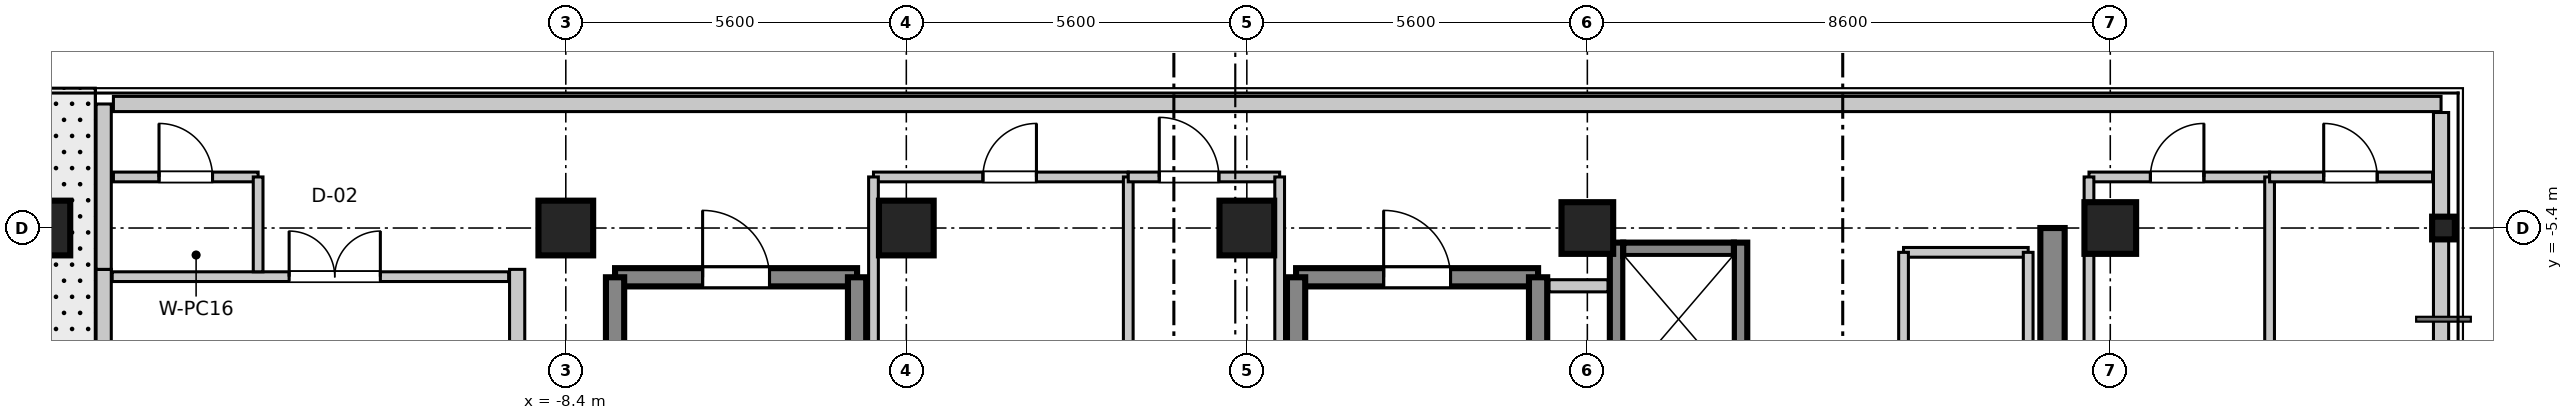
"""IFC4 building model, lengths in metres.
Left out: names, types, materials, properties, quantities, classifications, styles, units other than length and angle.
Written with IfcOpenShell. Run it as: python <this file> out.ifc"""

import sys

from ifc_helpers import new_model, si_unit, direction, frame, frame_2d, origin, origin_2d, place, context, subcontext, project, spatial, rectangle, i_section, extrude, source, transform, mapped, element, fill, save


model = new_model("IFC4")
c1 = context("Model", 3, precision=1e-05, world=origin(), true_north=direction((0.0, 1.0)))
c2 = subcontext(c1, "Body", "Model", "MODEL_VIEW")
j1 = project(units=[si_unit("LENGTHUNIT", "METRE"), si_unit("PLANEANGLEUNIT", "RADIAN")], contexts=[c1])
p1 = place(None, origin())
s1 = spatial("IfcSite", under=j1, at=p1, CompositionType="ELEMENT")
p2 = place(p1, origin())
s2 = spatial("IfcBuilding", under=s1, at=p2, CompositionType="ELEMENT")
p3 = place(p2, frame((0.0, 0.0, 296.5)))
s3 = spatial("IfcBuildingStorey", under=s2, at=p3, CompositionType="ELEMENT", Elevation=296.5)
m1 = source(origin(), c2, "Body", "SweptSolid", [
    extrude(rectangle(XDim=0.9, YDim=0.9, at=origin_2d()), origin(), (0.0, 0.0, 1.0), 3.805),
])
for number, where, z_axis, x_axis in (
    (1, (-17.0, -5.4, 0.0), (0.0, 0.0, 1.0), (1.0, 0.0, 0.0)),
    (2, (-8.4, -5.4, 0.0), (0.0, 0.0, 1.0), (1.0, 0.0, 0.0)),
    (3, (-2.8, -5.4, 0.0), (0.0, 0.0, 1.0), (1.0, 0.0, 0.0)),
    (4, (2.8, -5.4, 0.0), (0.0, 0.0, 1.0), (1.0, 0.0, 0.0)),
):
    element("IfcColumn", number, at=place(p3, frame(where, z_axis=z_axis, x_axis=x_axis)), inside=s3, PredefinedType="COLUMN", context=c2, shape_type="MappedRepresentation", body=[
        mapped(m1, transform((0.0, 0.0, 0.0), scale=1.0)),
    ])
m2 = source(origin(), c2, "Body", "SweptSolid", [
    extrude(rectangle(XDim=0.85, YDim=0.85, at=origin_2d()), origin(), (0.0, 0.0, 1.0), 3.805),
])
for number, where, z_axis, x_axis in (
    (5, (8.4, -5.4, 0.0), (0.0, 0.0, 1.0), (1.0, 0.0, 0.0)),
    (6, (17.0, -5.4, 0.0), (0.0, 0.0, 1.0), (1.0, 0.0, 0.0)),
):
    element("IfcColumn", number, at=place(p3, frame(where, z_axis=z_axis, x_axis=x_axis)), inside=s3, PredefinedType="PILASTER", context=c2, shape_type="MappedRepresentation", body=[
        mapped(m2, transform((0.0, 0.0, 0.0), scale=1.0)),
    ])
m3 = source(origin(), c2, "Body", "SweptSolid", [
    extrude(i_section(OverallWidth=0.374, OverallDepth=0.374, WebThickness=0.014, FlangeThickness=0.023, at=origin_2d()), origin(), (0.0, 0.0, 1.0), 3.805),
])
p4 = place(p3, frame((22.48, -5.4, 0.0), z_axis=(0.0, 0.0, 1.0), x_axis=(1.0, 0.0, 0.0)))
e7 = element("IfcColumn", 7, at=p4, inside=s3, PredefinedType="COLUMN", context=c2, shape_type="MappedRepresentation", body=[
    mapped(m3, transform((0.0, 0.0, 0.0), scale=1.0)),
])
m4 = source(origin(), c2, "Body", "SweptSolid", [
    extrude(rectangle(XDim=11.6, YDim=0.4, at=frame_2d((5.8, 0.0))), origin(), (0.0, 0.0, 1.0), 3.55),
])
p5 = place(p3, frame((16.05, -17.0, 0.0), z_axis=(0.0, 0.0, 1.0), x_axis=(0.0, 1.0, 0.0)))
e8 = element("IfcWall", 8, at=p5, inside=s3, PredefinedType="SHEAR", context=c2, shape_type="MappedRepresentation", body=[
    mapped(m4, transform((0.0, 0.0, 0.0), scale=1.0)),
])
m5 = source(origin(), c2, "Body", "SweptSolid", [
    extrude(rectangle(XDim=3.98, YDim=0.3, at=frame_2d((1.99, 0.0))), origin(), (0.0, 0.0, 1.0), 3.55),
])
p6 = place(p3, frame((3.61, -6.21, 0.0), z_axis=(0.0, 0.0, 1.0), x_axis=(1.0, 0.0, 0.0)))
e9 = element("IfcWall", 9, at=p6, inside=s3, PredefinedType="SHEAR", context=c2, shape_type="MappedRepresentation", body=[
    mapped(m5, transform((0.0, 0.0, 0.0), scale=1.0)),
])
p7 = place(p6, frame((1.44, 0.0, 0.0)))
e10 = element("IfcOpeningElement", 10, at=p7, cuts=e9, PredefinedType="OPENING", context=c2, shape_type="SweptSolid", body=[
    extrude(rectangle(XDim=1.1, YDim=2.15, at=frame_2d((0.55, 1.075))), frame((0.0, 0.16, 0.0), z_axis=(0.0, -1.0, 0.0), x_axis=(1.0, 0.0, 0.0)), (0.0, 0.0, 1.0), 0.32),
])
m6 = source(origin(), c2, "Body", "SweptSolid", [
    extrude(rectangle(XDim=9.38, YDim=0.3, at=frame_2d((4.69, 0.0))), origin(), (0.0, 0.0, 1.0), 3.55),
])
for number, where, z_axis, x_axis in (
    (11, (3.61, -15.59, 0.0), (0.0, 0.0, 1.0), (0.0, 1.0, 0.0)),
    (12, (7.59, -15.59, 0.0), (0.0, 0.0, 1.0), (0.0, 1.0, 0.0)),
):
    element("IfcWall", number, at=place(p3, frame(where, z_axis=z_axis, x_axis=x_axis)), inside=s3, PredefinedType="SHEAR", context=c2, shape_type="MappedRepresentation", body=[
        mapped(m6, transform((0.0, 0.0, 0.0), scale=1.0)),
    ])
p8 = place(p3, frame((-7.59, -6.21, 0.0), z_axis=(0.0, 0.0, 1.0), x_axis=(1.0, 0.0, 0.0)))
e13 = element("IfcWall", 13, at=p8, inside=s3, PredefinedType="SHEAR", context=c2, shape_type="MappedRepresentation", body=[
    mapped(m5, transform((0.0, 0.0, 0.0), scale=1.0)),
])
p9 = place(p8, frame((1.44, 0.0, 0.0)))
e14 = element("IfcOpeningElement", 14, at=p9, cuts=e13, PredefinedType="OPENING", context=c2, shape_type="SweptSolid", body=[
    extrude(rectangle(XDim=1.1, YDim=2.15, at=frame_2d((0.55, 1.075))), frame((0.0, 0.16, 0.0), z_axis=(0.0, -1.0, 0.0), x_axis=(1.0, 0.0, 0.0)), (0.0, 0.0, 1.0), 0.32),
])
for number, where, z_axis, x_axis in (
    (15, (-7.59, -15.59, 0.0), (0.0, 0.0, 1.0), (0.0, 1.0, 0.0)),
    (16, (-3.61, -15.59, 0.0), (0.0, 0.0, 1.0), (0.0, 1.0, 0.0)),
):
    element("IfcWall", number, at=place(p3, frame(where, z_axis=z_axis, x_axis=x_axis)), inside=s3, PredefinedType="SHEAR", context=c2, shape_type="MappedRepresentation", body=[
        mapped(m6, transform((0.0, 0.0, 0.0), scale=1.0)),
    ])
m7 = source(origin(), c2, "Body", "SweptSolid", [
    extrude(rectangle(XDim=2.36, YDim=0.22, at=frame_2d((1.18, 0.0))), origin(), (0.0, 0.0, 1.0), 3.55),
])
for number, where, z_axis, x_axis in (
    (17, (8.88, -8.0, 0.0), (0.0, 0.0, 1.0), (0.0, 1.0, 0.0)),
    (18, (10.92, -8.0, 0.0), (0.0, 0.0, 1.0), (0.0, 1.0, 0.0)),
):
    element("IfcWall", number, at=place(p3, frame(where, z_axis=z_axis, x_axis=x_axis)), inside=s3, PredefinedType="SHEAR", context=c2, shape_type="MappedRepresentation", body=[
        mapped(m7, transform((0.0, 0.0, 0.0), scale=1.0)),
    ])
m8 = source(origin(), c2, "Body", "SweptSolid", [
    extrude(rectangle(XDim=1.82, YDim=0.22, at=frame_2d((0.91, 0.0))), origin(), (0.0, 0.0, 1.0), 3.55),
])
p10 = place(p3, frame((8.99, -5.75, 0.0), z_axis=(0.0, 0.0, 1.0), x_axis=(1.0, 0.0, 0.0)))
e19 = element("IfcWall", 19, at=p10, inside=s3, PredefinedType="SHEAR", context=c2, shape_type="MappedRepresentation", body=[
    mapped(m8, transform((0.0, 0.0, 0.0), scale=1.0)),
])
m9 = source(origin(), c2, "Body", "SweptSolid", [
    extrude(rectangle(XDim=8.84, YDim=0.25, at=frame_2d((4.42, 0.0))), origin(), (0.0, 0.0, 1.0), 2.99),
])
for number, where, z_axis, x_axis in (
    (20, (-16.0, -14.92, 0.0), (0.0, 0.0, 1.0), (0.0, 1.0, 0.0)),
    (21, (-9.2, -14.92, 0.0), (0.0, 0.0, 1.0), (0.0, 1.0, 0.0)),
):
    element("IfcWall", number, at=place(p3, frame(where, z_axis=z_axis, x_axis=x_axis)), inside=s3, PredefinedType="STANDARD", context=c2, shape_type="MappedRepresentation", body=[
        mapped(m9, transform((0.0, 0.0, 0.0), scale=1.0)),
    ])
m10 = source(origin(), c2, "Body", "SweptSolid", [
    extrude(rectangle(XDim=0.97, YDim=0.2, at=frame_2d((0.485, 0.0))), origin(), (0.0, 0.0, 1.0), 2.89),
])
p11 = place(p3, frame((7.77, -6.35, 0.0), z_axis=(0.0, 0.0, 1.0), x_axis=(1.0, 0.0, 0.0)))
e22 = element("IfcWall", 22, at=p11, inside=s3, PredefinedType="PARTITIONING", context=c2, shape_type="MappedRepresentation", body=[
    mapped(m10, transform((0.0, 0.0, 0.0), scale=1.0)),
])
m11 = source(origin(), c2, "Body", "SweptSolid", [
    extrude(rectangle(XDim=38.28, YDim=0.25, at=frame_2d((19.14, 0.0))), origin(), (0.0, 0.0, 1.0), 2.89),
])
p12 = place(p3, frame((-15.84, -3.36, 0.0), z_axis=(0.0, 0.0, 1.0), x_axis=(1.0, 0.0, 0.0)))
e23 = element("IfcWall", 23, at=p12, inside=s3, PredefinedType="STANDARD", context=c2, shape_type="MappedRepresentation", body=[
    mapped(m11, transform((0.0, 0.0, 0.0), scale=1.0)),
])
m12 = source(origin(), c2, "Body", "SweptSolid", [
    extrude(rectangle(XDim=2.72, YDim=0.25, at=frame_2d((1.36, 0.0))), origin(), (0.0, 0.0, 1.0), 2.89),
])
p13 = place(p3, frame((-16.0, -6.08, 0.0), z_axis=(0.0, 0.0, 1.0), x_axis=(0.0, 1.0, 0.0)))
e24 = element("IfcWall", 24, at=p13, inside=s3, PredefinedType="STANDARD", context=c2, shape_type="MappedRepresentation", body=[
    mapped(m12, transform((0.0, 0.0, 0.0), scale=1.0)),
])
m13 = source(origin(), c2, "Body", "SweptSolid", [
    extrude(rectangle(XDim=16.12, YDim=0.25, at=frame_2d((8.06, 0.0))), origin(), (0.0, 0.0, 1.0), 2.89),
])
p14 = place(p3, frame((22.44, -19.62, 0.0), z_axis=(0.0, 0.0, 1.0), x_axis=(0.0, 1.0, 0.0)))
e25 = element("IfcWall", 25, at=p14, inside=s3, PredefinedType="STANDARD", context=c2, shape_type="MappedRepresentation", body=[
    mapped(m13, transform((0.0, 0.0, 0.0), scale=1.0)),
])
m14 = source(origin(), c2, "Body", "SweptSolid", [
    extrude(rectangle(XDim=2.05, YDim=0.16, at=frame_2d((1.025, 0.0))), origin(), (0.0, 0.0, 1.0), 2.89),
])
p15 = place(p3, frame((13.6, -5.8, 0.0), z_axis=(0.0, 0.0, 1.0), x_axis=(1.0, 0.0, 0.0)))
e26 = element("IfcWall", 26, at=p15, inside=s3, PredefinedType="PARTITIONING", context=c2, shape_type="MappedRepresentation", body=[
    mapped(m14, transform((0.0, 0.0, 0.0), scale=1.0)),
])
m15 = source(origin(), c2, "Body", "SweptSolid", [
    extrude(rectangle(XDim=8.7, YDim=0.16, at=frame_2d((4.35, 0.0))), origin(), (0.0, 0.0, 1.0), 2.89),
])
p16 = place(p3, frame((13.6, -14.5, 0.0), z_axis=(0.0, 0.0, 1.0), x_axis=(0.0, 1.0, 0.0)))
e27 = element("IfcWall", 27, at=p16, inside=s3, PredefinedType="PARTITIONING", context=c2, shape_type="MappedRepresentation", body=[
    mapped(m15, transform((0.0, 0.0, 0.0), scale=1.0)),
])
p17 = place(p16, frame((3.85, 0.0, 0.0)))
e28 = element("IfcOpeningElement", 28, at=p17, cuts=e27, PredefinedType="OPENING", context=c2, shape_type="SweptSolid", body=[
    extrude(rectangle(XDim=1.0, YDim=2.1, at=frame_2d((0.5, 1.05))), frame((0.0, 0.09, 0.0), z_axis=(0.0, -1.0, 0.0), x_axis=(1.0, 0.0, 0.0)), (0.0, 0.0, 1.0), 0.18),
])
p18 = place(p3, frame((15.65, -14.5, 0.0), z_axis=(0.0, 0.0, 1.0), x_axis=(0.0, 1.0, 0.0)))
e29 = element("IfcWall", 29, at=p18, inside=s3, PredefinedType="PARTITIONING", context=c2, shape_type="MappedRepresentation", body=[
    mapped(m15, transform((0.0, 0.0, 0.0), scale=1.0)),
])
m16 = source(origin(), c2, "Body", "SweptSolid", [
    extrude(rectangle(XDim=6.52, YDim=0.16, at=frame_2d((3.26, 0.0))), origin(), (0.0, 0.0, 1.0), 2.89),
])
p19 = place(p3, frame((-15.86, -6.2, 0.0), z_axis=(0.0, 0.0, 1.0), x_axis=(1.0, 0.0, 0.0)))
e30 = element("IfcWall", 30, at=p19, inside=s3, PredefinedType="PARTITIONING", context=c2, shape_type="MappedRepresentation", body=[
    mapped(m16, transform((0.0, 0.0, 0.0), scale=1.0)),
])
p20 = place(p19, frame((2.91, 0.0, 0.0)))
e31 = element("IfcOpeningElement", 31, at=p20, cuts=e30, PredefinedType="OPENING", context=c2, shape_type="SweptSolid", body=[
    extrude(rectangle(XDim=1.5, YDim=2.15, at=frame_2d((0.75, 1.075))), frame((0.0, 0.09, 0.0), z_axis=(0.0, -1.0, 0.0), x_axis=(1.0, 0.0, 0.0)), (0.0, 0.0, 1.0), 0.18),
])
m17 = source(origin(), c2, "Body", "SweptSolid", [
    extrude(rectangle(XDim=2.38, YDim=0.16, at=frame_2d((1.19, 0.0))), origin(), (0.0, 0.0, 1.0), 2.89),
])
p21 = place(p3, frame((-15.84, -4.56, 0.0), z_axis=(0.0, 0.0, 1.0), x_axis=(1.0, 0.0, 0.0)))
e32 = element("IfcWall", 32, at=p21, inside=s3, PredefinedType="PARTITIONING", context=c2, shape_type="MappedRepresentation", body=[
    mapped(m17, transform((0.0, 0.0, 0.0), scale=1.0)),
])
p22 = place(p21, frame((0.75, 0.0, 0.0)))
e33 = element("IfcOpeningElement", 33, at=p22, cuts=e32, PredefinedType="OPENING", context=c2, shape_type="SweptSolid", body=[
    extrude(rectangle(XDim=0.88, YDim=2.1, at=frame_2d((0.44, 1.05))), frame((0.0, 0.09, 0.0), z_axis=(0.0, -1.0, 0.0), x_axis=(1.0, 0.0, 0.0)), (0.0, 0.0, 1.0), 0.18),
])
m18 = source(origin(), c2, "Body", "SweptSolid", [
    extrude(rectangle(XDim=1.56, YDim=0.16, at=frame_2d((0.78, 0.0))), origin(), (0.0, 0.0, 1.0), 2.89),
])
p23 = place(p3, frame((-13.46, -6.12, 0.0), z_axis=(0.0, 0.0, 1.0), x_axis=(0.0, 1.0, 0.0)))
e34 = element("IfcWall", 34, at=p23, inside=s3, PredefinedType="PARTITIONING", context=c2, shape_type="MappedRepresentation", body=[
    mapped(m18, transform((0.0, 0.0, 0.0), scale=1.0)),
])
m19 = source(origin(), c2, "Body", "SweptSolid", [
    extrude(rectangle(XDim=4.19, YDim=0.16, at=frame_2d((2.095, 0.0))), origin(), (0.0, 0.0, 1.0), 2.89),
])
p24 = place(p3, frame((-3.34, -4.56, 0.0), z_axis=(0.0, 0.0, 1.0), x_axis=(1.0, 0.0, 0.0)))
e35 = element("IfcWall", 35, at=p24, inside=s3, PredefinedType="PARTITIONING", context=c2, shape_type="MappedRepresentation", body=[
    mapped(m19, transform((0.0, 0.0, 0.0), scale=1.0)),
])
p25 = place(p24, frame((1.8, 0.0, 0.0)))
e36 = element("IfcOpeningElement", 36, at=p25, cuts=e35, PredefinedType="OPENING", context=c2, shape_type="SweptSolid", body=[
    extrude(rectangle(XDim=0.88, YDim=2.1, at=frame_2d((0.44, 1.05))), frame((0.0, 0.09, 0.0), z_axis=(0.0, -1.0, 0.0), x_axis=(1.0, 0.0, 0.0)), (0.0, 0.0, 1.0), 0.18),
])
m20 = source(origin(), c2, "Body", "SweptSolid", [
    extrude(rectangle(XDim=11.26, YDim=0.16, at=frame_2d((5.63, 0.0))), origin(), (0.0, 0.0, 1.0), 2.89),
])
p26 = place(p3, frame((-3.34, -15.82, 0.0), z_axis=(0.0, 0.0, 1.0), x_axis=(0.0, 1.0, 0.0)))
e37 = element("IfcWall", 37, at=p26, inside=s3, PredefinedType="PARTITIONING", context=c2, shape_type="MappedRepresentation", body=[
    mapped(m20, transform((0.0, 0.0, 0.0), scale=1.0)),
])
m21 = source(origin(), c2, "Body", "SweptSolid", [
    extrude(rectangle(XDim=17.74, YDim=0.16, at=frame_2d((8.87, 0.0))), origin(), (0.0, 0.0, 1.0), 2.89),
])
p27 = place(p3, frame((0.85, -22.3, 0.0), z_axis=(0.0, 0.0, 1.0), x_axis=(0.0, 1.0, 0.0)))
e38 = element("IfcWall", 38, at=p27, inside=s3, PredefinedType="PARTITIONING", context=c2, shape_type="MappedRepresentation", body=[
    mapped(m21, transform((0.0, 0.0, 0.0), scale=1.0)),
])
m22 = source(origin(), c2, "Body", "SweptSolid", [
    extrude(rectangle(XDim=2.49, YDim=0.16, at=frame_2d((1.245, 0.0))), origin(), (0.0, 0.0, 1.0), 2.89),
])
p28 = place(p3, frame((0.85, -4.56, 0.0), z_axis=(0.0, 0.0, 1.0), x_axis=(1.0, 0.0, 0.0)))
e39 = element("IfcWall", 39, at=p28, inside=s3, PredefinedType="PARTITIONING", context=c2, shape_type="MappedRepresentation", body=[
    mapped(m22, transform((0.0, 0.0, 0.0), scale=1.0)),
])
p29 = place(p28, frame((0.51, 0.0, 0.0)))
e40 = element("IfcOpeningElement", 40, at=p29, cuts=e39, PredefinedType="OPENING", context=c2, shape_type="SweptSolid", body=[
    extrude(rectangle(XDim=0.98, YDim=2.1, at=frame_2d((0.49, 1.05))), frame((0.0, 0.09, 0.0), z_axis=(0.0, -1.0, 0.0), x_axis=(1.0, 0.0, 0.0)), (0.0, 0.0, 1.0), 0.18),
])
p30 = place(p3, frame((3.34, -22.3, 0.0), z_axis=(0.0, 0.0, 1.0), x_axis=(0.0, 1.0, 0.0)))
e41 = element("IfcWall", 41, at=p30, inside=s3, PredefinedType="PARTITIONING", context=c2, shape_type="MappedRepresentation", body=[
    mapped(m21, transform((0.0, 0.0, 0.0), scale=1.0)),
])
m23 = source(origin(), c2, "Body", "SweptSolid", [
    extrude(rectangle(XDim=2.97, YDim=0.16, at=frame_2d((1.485, 0.0))), origin(), (0.0, 0.0, 1.0), 2.89),
])
p31 = place(p3, frame((16.65, -4.56, 0.0), z_axis=(0.0, 0.0, 1.0), x_axis=(1.0, 0.0, 0.0)))
e42 = element("IfcWall", 42, at=p31, inside=s3, PredefinedType="PARTITIONING", context=c2, shape_type="MappedRepresentation", body=[
    mapped(m23, transform((0.0, 0.0, 0.0), scale=1.0)),
])
p32 = place(p31, frame((1.01, 0.0, 0.0)))
e43 = element("IfcOpeningElement", 43, at=p32, cuts=e42, PredefinedType="OPENING", context=c2, shape_type="SweptSolid", body=[
    extrude(rectangle(XDim=0.88, YDim=2.1, at=frame_2d((0.44, 1.05))), frame((0.0, 0.09, 0.0), z_axis=(0.0, -1.0, 0.0), x_axis=(1.0, 0.0, 0.0)), (0.0, 0.0, 1.0), 0.18),
])
for number, where, z_axis, x_axis in (
    (44, (16.65, -22.3, 0.0), (0.0, 0.0, 1.0), (0.0, 1.0, 0.0)),
    (45, (19.62, -22.3, 0.0), (0.0, 0.0, 1.0), (0.0, 1.0, 0.0)),
):
    element("IfcWall", number, at=place(p3, frame(where, z_axis=z_axis, x_axis=x_axis)), inside=s3, PredefinedType="PARTITIONING", context=c2, shape_type="MappedRepresentation", body=[
        mapped(m21, transform((0.0, 0.0, 0.0), scale=1.0)),
    ])
m24 = source(origin(), c2, "Body", "SweptSolid", [
    extrude(rectangle(XDim=2.68, YDim=0.16, at=frame_2d((1.34, 0.0))), origin(), (0.0, 0.0, 1.0), 2.89),
])
p33 = place(p3, frame((19.62, -4.56, 0.0), z_axis=(0.0, 0.0, 1.0), x_axis=(1.0, 0.0, 0.0)))
e46 = element("IfcWall", 46, at=p33, inside=s3, PredefinedType="PARTITIONING", context=c2, shape_type="MappedRepresentation", body=[
    mapped(m24, transform((0.0, 0.0, 0.0), scale=1.0)),
])
p34 = place(p33, frame((0.89, 0.0, 0.0)))
e47 = element("IfcOpeningElement", 47, at=p34, cuts=e46, PredefinedType="OPENING", context=c2, shape_type="SweptSolid", body=[
    extrude(rectangle(XDim=0.88, YDim=2.1, at=frame_2d((0.44, 1.05))), frame((0.0, 0.09, 0.0), z_axis=(0.0, -1.0, 0.0), x_axis=(1.0, 0.0, 0.0)), (0.0, 0.0, 1.0), 0.18),
])
m25 = source(origin(), c2, "Body", "SweptSolid", [
    extrude(rectangle(XDim=1.1, YDim=2.15, at=frame_2d((0.55, 1.075))), frame((0.0, 0.025, 0.0), z_axis=(0.0, -1.0, 0.0), x_axis=(1.0, 0.0, 0.0)), (0.0, 0.0, 1.0), 0.05),
])
p35 = place(p7, frame((1.1, 0.0, 0.0), z_axis=(0.0, 0.0, 1.0), x_axis=(-1.0, 0.0, 0.0)))
e48 = element("IfcDoor", 48, at=p35, inside=s3, OperationType="SINGLE_SWING_LEFT", PredefinedType="DOOR", context=c2, shape_type="MappedRepresentation", body=[
    mapped(m25, transform((0.0, 0.0, 0.0), scale=1.0)),
])
fill(e10, e48)
p36 = place(p9, frame((1.1, 0.0, 0.0), z_axis=(0.0, 0.0, 1.0), x_axis=(-1.0, 0.0, 0.0)))
e49 = element("IfcDoor", 49, at=p36, inside=s3, OperationType="SINGLE_SWING_LEFT", PredefinedType="DOOR", context=c2, shape_type="MappedRepresentation", body=[
    mapped(m25, transform((0.0, 0.0, 0.0), scale=1.0)),
])
fill(e14, e49)
m26 = source(origin(), c2, "Body", "SweptSolid", [
    extrude(rectangle(XDim=1.5, YDim=2.15, at=frame_2d((0.75, 1.075))), frame((0.0, 0.025, 0.0), z_axis=(0.0, -1.0, 0.0), x_axis=(1.0, 0.0, 0.0)), (0.0, 0.0, 1.0), 0.05),
])
p37 = place(p20, frame((1.5, 0.0, 0.0), z_axis=(0.0, 0.0, 1.0), x_axis=(-1.0, 0.0, 0.0)))
e50 = element("IfcDoor", 50, at=p37, inside=s3, OperationType="DOUBLE_DOOR_SINGLE_SWING", PredefinedType="DOOR", context=c2, shape_type="MappedRepresentation", body=[
    mapped(m26, transform((0.0, 0.0, 0.0), scale=1.0)),
])
fill(e31, e50)
m27 = source(origin(), c2, "Body", "SweptSolid", [
    extrude(rectangle(XDim=0.88, YDim=2.1, at=frame_2d((0.44, 1.05))), frame((0.0, 0.025, 0.0), z_axis=(0.0, -1.0, 0.0), x_axis=(1.0, 0.0, 0.0)), (0.0, 0.0, 1.0), 0.05),
])
p38 = place(p22, frame((0.88, 0.0, 0.0), z_axis=(0.0, 0.0, 1.0), x_axis=(-1.0, 0.0, 0.0)))
e51 = element("IfcDoor", 51, at=p38, inside=s3, OperationType="SINGLE_SWING_LEFT", PredefinedType="DOOR", context=c2, shape_type="MappedRepresentation", body=[
    mapped(m27, transform((0.0, 0.0, 0.0), scale=1.0)),
])
fill(e33, e51)
p39 = place(p25, frame((0.88, 0.0, 0.0), z_axis=(0.0, 0.0, 1.0), x_axis=(-1.0, 0.0, 0.0)))
e52 = element("IfcDoor", 52, at=p39, inside=s3, OperationType="SINGLE_SWING_RIGHT", PredefinedType="DOOR", context=c2, shape_type="MappedRepresentation", body=[
    mapped(m27, transform((0.0, 0.0, 0.0), scale=1.0)),
])
fill(e36, e52)
m28 = source(origin(), c2, "Body", "SweptSolid", [
    extrude(rectangle(XDim=0.98, YDim=2.1, at=frame_2d((0.49, 1.05))), frame((0.0, 0.025, 0.0), z_axis=(0.0, -1.0, 0.0), x_axis=(1.0, 0.0, 0.0)), (0.0, 0.0, 1.0), 0.05),
])
p40 = place(p29, frame((0.98, 0.0, 0.0), z_axis=(0.0, 0.0, 1.0), x_axis=(-1.0, 0.0, 0.0)))
e53 = element("IfcDoor", 53, at=p40, inside=s3, OperationType="SINGLE_SWING_LEFT", PredefinedType="DOOR", context=c2, shape_type="MappedRepresentation", body=[
    mapped(m28, transform((0.0, 0.0, 0.0), scale=1.0)),
])
fill(e40, e53)
p41 = place(p32, frame((0.88, 0.0, 0.0), z_axis=(0.0, 0.0, 1.0), x_axis=(-1.0, 0.0, 0.0)))
e54 = element("IfcDoor", 54, at=p41, inside=s3, OperationType="SINGLE_SWING_RIGHT", PredefinedType="DOOR", context=c2, shape_type="MappedRepresentation", body=[
    mapped(m27, transform((0.0, 0.0, 0.0), scale=1.0)),
])
fill(e43, e54)
p42 = place(p34, frame((0.88, 0.0, 0.0), z_axis=(0.0, 0.0, 1.0), x_axis=(-1.0, 0.0, 0.0)))
e55 = element("IfcDoor", 55, at=p42, inside=s3, OperationType="SINGLE_SWING_LEFT", PredefinedType="DOOR", context=c2, shape_type="MappedRepresentation", body=[
    mapped(m27, transform((0.0, 0.0, 0.0), scale=1.0)),
])
fill(e47, e55)
save(model, sys.argv[1])
